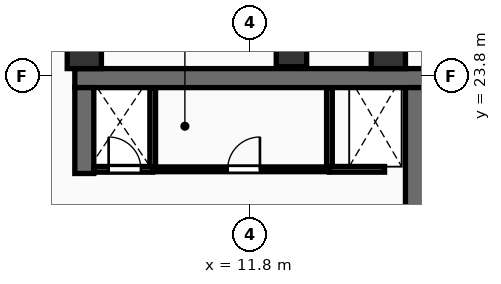
"""IFC4 building model, lengths in metres.
Left out: names, types, materials, properties, quantities, classifications, styles, units other than length and angle.
Written with IfcOpenShell. Run it as: python <this file> out.ifc"""

import sys

from ifc_helpers import new_model, si_unit, direction, frame, frame_2d, origin, origin_2d, place, context, subcontext, project, spatial, rectangle, extrude, element, fill, save


model = new_model("IFC4")
c1 = context("Model", 3, precision=1e-05, world=origin(), true_north=direction((0.0, 1.0)))
c2 = subcontext(c1, "Body", "Model", "MODEL_VIEW")
j1 = project(units=[si_unit("LENGTHUNIT", "METRE"), si_unit("PLANEANGLEUNIT", "RADIAN")], contexts=[c1])
p1 = place(None, origin())
s1 = spatial("IfcSite", under=j1, at=p1, CompositionType="ELEMENT")
p2 = place(p1, origin())
s2 = spatial("IfcBuilding", under=s1, at=p2, CompositionType="ELEMENT")
p3 = place(p2, frame((0.0, 0.0, 262.8)))
s3 = spatial("IfcBuildingStorey", under=s2, at=p3, CompositionType="ELEMENT", Elevation=262.8)
p4 = place(p3, frame((7.2, 23.75, 0.0), z_axis=(0.0, 0.0, 1.0), x_axis=(1.0, 0.0, 0.0)))
e1 = element("IfcWall", 1, at=p4, inside=s3, PredefinedType="SHEAR", context=c2, shape_type="SweptSolid", body=[
    extrude(rectangle(XDim=13.85, YDim=0.5, at=frame_2d((6.925, 0.0))), origin(), (0.0, 0.0, 1.0), 3.56),
])
p5 = place(p3, frame((7.45, 21.24, 0.0), z_axis=(0.0, 0.0, 1.0), x_axis=(0.0, 1.0, 0.0)))
e2 = element("IfcWall", 2, at=p5, inside=s3, PredefinedType="SHEAR", context=c2, shape_type="SweptSolid", body=[
    extrude(rectangle(XDim=2.26, YDim=0.5, at=frame_2d((1.13, 0.0))), origin(), (0.0, 0.0, 1.0), 3.56),
])
p6 = place(p3, frame((16.15, 14.4, 0.0), z_axis=(0.0, 0.0, 1.0), x_axis=(0.0, 1.0, 0.0)))
e3 = element("IfcWall", 3, at=p6, inside=s3, PredefinedType="SHEAR", context=c2, shape_type="SweptSolid", body=[
    extrude(rectangle(XDim=9.1, YDim=0.5, at=frame_2d((4.55, 0.0))), origin(), (0.0, 0.0, 1.0), 3.56),
])
for number, where, z_axis, x_axis in (
    (4, (7.45, 24.45, 0.0), (0.0, 0.0, 1.0), (1.0, 0.0, 0.0)),
    (5, (15.45, 24.45, 0.0), (0.0, 0.0, 1.0), (1.0, 0.0, 0.0)),
):
    element("IfcColumn", number, at=place(p3, frame(where, z_axis=z_axis, x_axis=x_axis)), inside=s3, PredefinedType="COLUMN", context=c2, shape_type="SweptSolid", body=[
        extrude(rectangle(XDim=0.9, YDim=0.9, at=origin_2d()), origin(), (0.0, 0.0, 1.0), 3.56),
    ])
p7 = place(p3, frame((12.9, 24.45, 0.0), z_axis=(0.0, 0.0, 1.0), x_axis=(1.0, 0.0, 0.0)))
e6 = element("IfcColumn", 6, at=p7, inside=s3, PredefinedType="COLUMN", context=c2, shape_type="SweptSolid", body=[
    extrude(rectangle(XDim=0.8, YDim=0.8, at=origin_2d()), origin(), (0.0, 0.0, 1.0), 3.56),
])
for number, where, z_axis, x_axis in (
    (7, (9.25, 21.35, 0.0), (0.0, 0.0, 1.0), (0.0, 1.0, 0.0)),
    (8, (13.9, 21.35, 0.0), (0.0, 0.0, 1.0), (0.0, 1.0, 0.0)),
):
    element("IfcWall", number, at=place(p3, frame(where, z_axis=z_axis, x_axis=x_axis)), inside=s3, PredefinedType="PARTITIONING", context=c2, shape_type="SweptSolid", body=[
        extrude(rectangle(XDim=2.13, YDim=0.15, at=frame_2d((1.065, 0.0))), origin(), (0.0, 0.0, 1.0), 3.56),
    ])
p8 = place(p3, frame((7.7, 21.35, 0.0), z_axis=(0.0, 0.0, 1.0), x_axis=(1.0, 0.0, 0.0)))
e9 = element("IfcWall", 9, at=p8, inside=s3, PredefinedType="PARTITIONING", context=c2, shape_type="SweptSolid", body=[
    extrude(rectangle(XDim=1.55, YDim=0.15, at=frame_2d((0.775, 0.0))), origin(), (0.0, 0.0, 1.0), 3.56),
])
p9 = place(p8, frame((0.39, 0.0, 0.0)))
e10 = element("IfcOpeningElement", 10, at=p9, cuts=e9, PredefinedType="OPENING", context=c2, shape_type="SweptSolid", body=[
    extrude(rectangle(XDim=0.85, YDim=2.15, at=frame_2d((0.425, 1.075))), frame((0.0, 0.085, 0.0), z_axis=(0.0, -1.0, 0.0), x_axis=(1.0, 0.0, 0.0)), (0.0, 0.0, 1.0), 0.17),
])
p10 = place(p3, frame((13.9, 21.35, 0.0), z_axis=(0.0, 0.0, 1.0), x_axis=(1.0, 0.0, 0.0)))
e11 = element("IfcWall", 11, at=p10, inside=s3, PredefinedType="PARTITIONING", context=c2, shape_type="SweptSolid", body=[
    extrude(rectangle(XDim=1.45, YDim=0.15, at=frame_2d((0.725, 0.0))), origin(), (0.0, 0.0, 1.0), 3.56),
])
p11 = place(p3, frame((9.25, 21.35, 0.0), z_axis=(0.0, 0.0, 1.0), x_axis=(1.0, 0.0, 0.0)))
e12 = element("IfcWall", 12, at=p11, inside=s3, PredefinedType="PARTITIONING", context=c2, shape_type="SweptSolid", body=[
    extrude(rectangle(XDim=4.65, YDim=0.125, at=frame_2d((2.325, 0.0))), origin(), (0.0, 0.0, 1.0), 3.56),
])
p12 = place(p11, frame((1.971, 0.0, 0.0)))
e13 = element("IfcOpeningElement", 13, at=p12, cuts=e12, PredefinedType="OPENING", context=c2, shape_type="SweptSolid", body=[
    extrude(rectangle(XDim=0.85, YDim=2.15, at=frame_2d((0.425, 1.075))), frame((0.0, 0.073, 0.0), z_axis=(0.0, -1.0, 0.0), x_axis=(1.0, 0.0, 0.0)), (0.0, 0.0, 1.0), 0.145),
])
p13 = place(p9, origin())
e14 = element("IfcDoor", 14, at=p13, inside=s3, OperationType="SINGLE_SWING_LEFT", PredefinedType="DOOR", context=c2, shape_type="SweptSolid", body=[
    extrude(rectangle(XDim=0.85, YDim=2.15, at=frame_2d((0.425, 1.075))), frame((0.0, 0.025, 0.0), z_axis=(0.0, -1.0, 0.0), x_axis=(1.0, 0.0, 0.0)), (0.0, 0.0, 1.0), 0.05),
])
fill(e10, e14)
p14 = place(p12, origin())
e15 = element("IfcDoor", 15, at=p14, inside=s3, OperationType="SINGLE_SWING_RIGHT", PredefinedType="DOOR", context=c2, shape_type="SweptSolid", body=[
    extrude(rectangle(XDim=0.85, YDim=2.15, at=frame_2d((0.425, 1.075))), frame((0.0, 0.025, 0.0), z_axis=(0.0, -1.0, 0.0), x_axis=(1.0, 0.0, 0.0)), (0.0, 0.0, 1.0), 0.05),
])
fill(e13, e15)
save(model, sys.argv[1])
